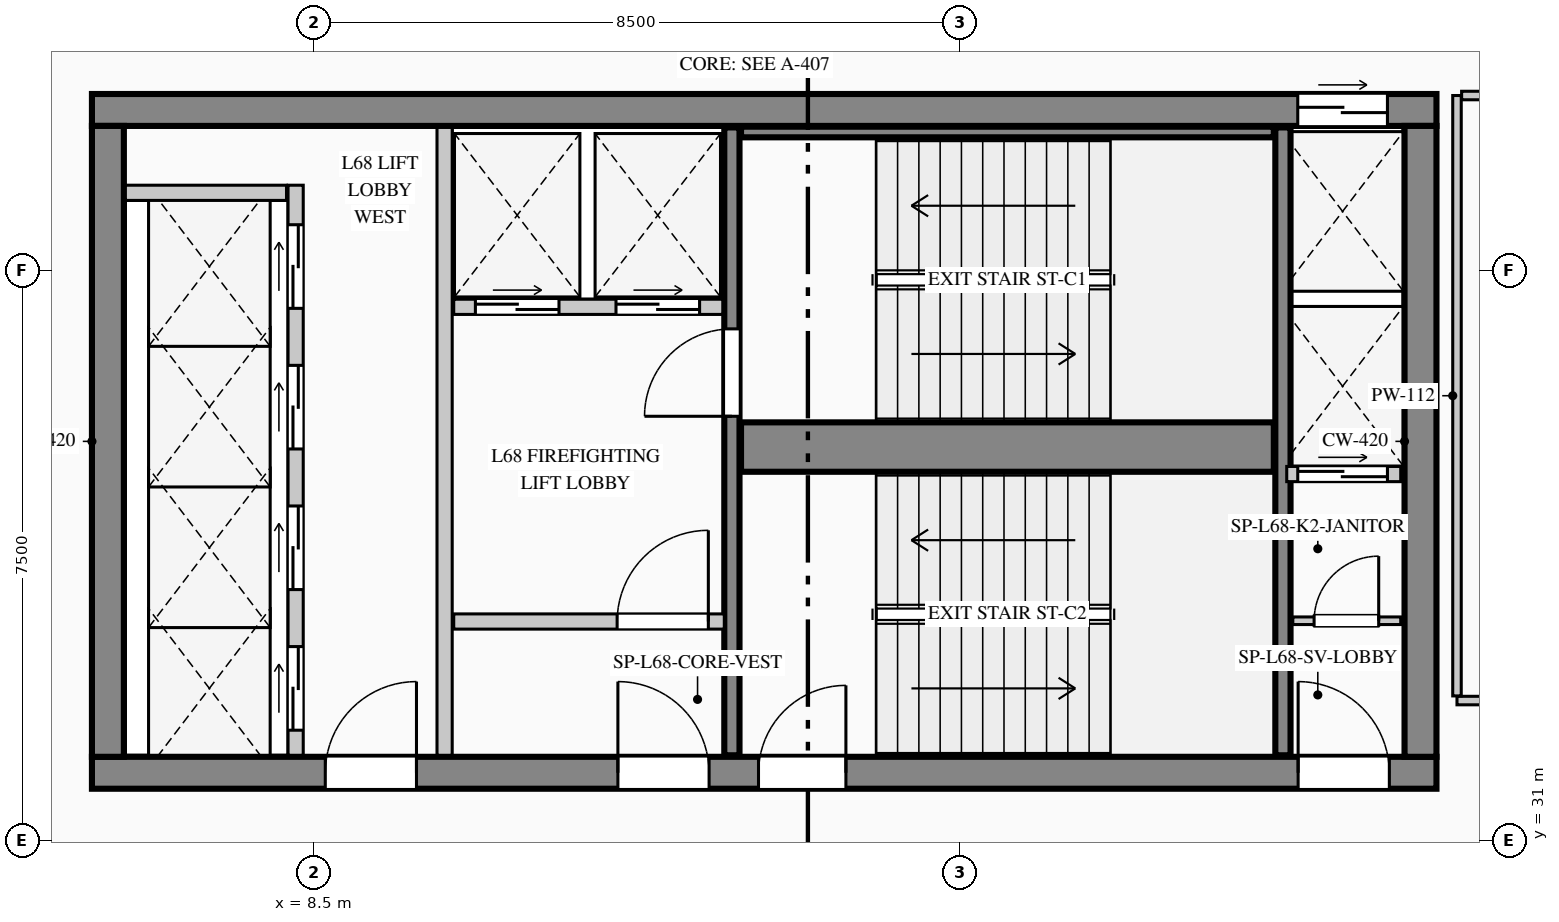
"""IFC4 building model, lengths in metres.
Left out: names, types, materials, properties, quantities, classifications, styles, units other than length and angle.
Written with IfcOpenShell. Run it as: python <this file> out.ifc"""

import sys

from ifc_helpers import new_model, si_unit, direction, frame, frame_2d, origin, place, context, subcontext, project, spatial, rectangle, extrude, element, fill, save


model = new_model("IFC4")
c1 = context("Model", 3, precision=1e-05, world=origin(), true_north=direction((0.0, 1.0)))
c2 = subcontext(c1, "Body", "Model", "MODEL_VIEW")
j1 = project(units=[si_unit("LENGTHUNIT", "METRE"), si_unit("PLANEANGLEUNIT", "RADIAN")], contexts=[c1])
p1 = place(None, origin())
s1 = spatial("IfcSite", under=j1, at=p1, CompositionType="ELEMENT")
p2 = place(p1, origin())
s2 = spatial("IfcBuilding", under=s1, at=p2, CompositionType="ELEMENT")
p3 = place(p2, frame((0.0, 0.0, 284.35)))
s3 = spatial("IfcBuildingStorey", under=s2, at=p3, CompositionType="ELEMENT", Elevation=284.35)
p4 = place(p3, frame((5.58, 40.61, 0.0), z_axis=(0.0, 0.0, 1.0), x_axis=(1.0, 0.0, 0.0)))
e1 = element("IfcWall", 1, at=p4, inside=s3, PredefinedType="SHEAR", context=c2, shape_type="SweptSolid", body=[
    extrude(rectangle(XDim=17.69, YDim=0.42, at=frame_2d((8.845, 0.0))), origin(), (0.0, 0.0, 1.0), 3.95),
])
p5 = place(p4, frame((15.865, 0.0, 0.0)))
e2 = element("IfcOpeningElement", 2, at=p5, cuts=e1, PredefinedType="OPENING", context=c2, shape_type="SweptSolid", body=[
    extrude(rectangle(XDim=1.18, YDim=2.25, at=frame_2d((0.59, 1.125))), frame((0.0, 0.22, 0.0), z_axis=(0.0, -1.0, 0.0), x_axis=(1.0, 0.0, 0.0)), (0.0, 0.0, 1.0), 0.44),
])
p6 = place(p3, frame((5.58, 31.89, 0.0), z_axis=(0.0, 0.0, 1.0), x_axis=(1.0, 0.0, 0.0)))
e3 = element("IfcWall", 3, at=p6, inside=s3, PredefinedType="SHEAR", context=c2, shape_type="SweptSolid", body=[
    extrude(rectangle(XDim=17.69, YDim=0.42, at=frame_2d((8.845, 0.0))), origin(), (0.0, 0.0, 1.0), 3.95),
])
p7 = place(p6, frame((3.07, 0.0, 0.0)))
e4 = element("IfcOpeningElement", 4, at=p7, cuts=e3, PredefinedType="OPENING", context=c2, shape_type="SweptSolid", body=[
    extrude(rectangle(XDim=1.2, YDim=2.2, at=frame_2d((0.6, 1.1))), frame((0.0, 0.22, 0.0), z_axis=(0.0, -1.0, 0.0), x_axis=(1.0, 0.0, 0.0)), (0.0, 0.0, 1.0), 0.44),
])
p8 = place(p6, frame((6.92, 0.0, 0.0)))
e5 = element("IfcOpeningElement", 5, at=p8, cuts=e3, PredefinedType="OPENING", context=c2, shape_type="SweptSolid", body=[
    extrude(rectangle(XDim=1.2, YDim=2.2, at=frame_2d((0.6, 1.1))), frame((0.0, 0.22, 0.0), z_axis=(0.0, -1.0, 0.0), x_axis=(1.0, 0.0, 0.0)), (0.0, 0.0, 1.0), 0.44),
])
p9 = place(p6, frame((8.77, 0.0, 0.0)))
e6 = element("IfcOpeningElement", 6, at=p9, cuts=e3, PredefinedType="OPENING", context=c2, shape_type="SweptSolid", body=[
    extrude(rectangle(XDim=1.15, YDim=2.2, at=frame_2d((0.575, 1.1))), frame((0.0, 0.22, 0.0), z_axis=(0.0, -1.0, 0.0), x_axis=(1.0, 0.0, 0.0)), (0.0, 0.0, 1.0), 0.44),
])
p10 = place(p6, frame((15.87, 0.0, 0.0)))
e7 = element("IfcOpeningElement", 7, at=p10, cuts=e3, PredefinedType="OPENING", context=c2, shape_type="SweptSolid", body=[
    extrude(rectangle(XDim=1.2, YDim=2.2, at=frame_2d((0.6, 1.1))), frame((0.0, 0.22, 0.0), z_axis=(0.0, -1.0, 0.0), x_axis=(1.0, 0.0, 0.0)), (0.0, 0.0, 1.0), 0.44),
])
for number, where, z_axis, x_axis in (
    (8, (5.79, 32.1, 0.0), (0.0, 0.0, 1.0), (0.0, 1.0, 0.0)),
    (9, (23.06, 32.1, 0.0), (0.0, 0.0, 1.0), (0.0, 1.0, 0.0)),
):
    element("IfcWall", number, at=place(p3, frame(where, z_axis=z_axis, x_axis=x_axis)), inside=s3, PredefinedType="SHEAR", context=c2, shape_type="SweptSolid", body=[
        extrude(rectangle(XDim=8.3, YDim=0.42, at=frame_2d((4.15, 0.0))), origin(), (0.0, 0.0, 1.0), 3.95),
    ])
p11 = place(p3, frame((14.0, 32.12, 0.0), z_axis=(0.0, 0.0, 1.0), x_axis=(0.0, 1.0, 0.0)))
e10 = element("IfcWall", 10, at=p11, inside=s3, PredefinedType="SHEAR", context=c2, shape_type="SweptSolid", body=[
    extrude(rectangle(XDim=8.26, YDim=0.2, at=frame_2d((4.13, 0.0))), origin(), (0.0, 0.0, 1.0), 3.95),
])
p12 = place(p11, frame((4.46, 0.0, 0.0)))
e11 = element("IfcOpeningElement", 11, at=p12, cuts=e10, PredefinedType="OPENING", context=c2, shape_type="SweptSolid", body=[
    extrude(rectangle(XDim=1.15, YDim=2.2, at=frame_2d((0.575, 1.1))), frame((0.0, 0.11, 0.0), z_axis=(0.0, -1.0, 0.0), x_axis=(1.0, 0.0, 0.0)), (0.0, 0.0, 1.0), 0.22),
])
p13 = place(p3, frame((14.12, 36.175, 0.0), z_axis=(0.0, 0.0, 1.0), x_axis=(1.0, 0.0, 0.0)))
e12 = element("IfcWall", 12, at=p13, inside=s3, PredefinedType="SHEAR", context=c2, shape_type="SweptSolid", body=[
    extrude(rectangle(XDim=7.01, YDim=0.65, at=frame_2d((3.505, 0.0))), origin(), (0.0, 0.0, 1.0), 3.95),
])
p14 = place(p3, frame((21.25, 32.12, 0.0), z_axis=(0.0, 0.0, 1.0), x_axis=(0.0, 1.0, 0.0)))
e13 = element("IfcWall", 13, at=p14, inside=s3, PredefinedType="SHEAR", context=c2, shape_type="SweptSolid", body=[
    extrude(rectangle(XDim=8.26, YDim=0.2, at=frame_2d((4.13, 0.0))), origin(), (0.0, 0.0, 1.0), 3.95),
])
p15 = place(p3, frame((14.12, 40.32, 0.0), z_axis=(0.0, 0.0, 1.0), x_axis=(1.0, 0.0, 0.0)))
e14 = element("IfcWall", 14, at=p15, inside=s3, PredefinedType="SHEAR", context=c2, shape_type="SweptSolid", body=[
    extrude(rectangle(XDim=7.01, YDim=0.14, at=frame_2d((3.505, 0.0))), origin(), (0.0, 0.0, 1.0), 3.95),
])
p16 = place(p3, frame((5.6, 4.32, 0.0), z_axis=(0.0, 0.0, 1.0), x_axis=(-0.075839920993, 0.997120006009, 0.0)))
e15 = element("IfcWall", 15, at=p16, inside=s3, PredefinedType="STANDARD", context=c2, shape_type="SweptSolid", body=[
    extrude(rectangle(XDim=37.468, YDim=0.24, at=frame_2d((18.734, 0.0))), origin(), (0.0, 0.0, 1.0), 3.7),
])
p17 = place(p16, frame((12.663, 0.0, 0.9)))
e16 = element("IfcOpeningElement", 16, at=p17, cuts=e15, PredefinedType="OPENING", context=c2, shape_type="SweptSolid", body=[
    extrude(rectangle(XDim=1.65, YDim=1.95, at=frame_2d((0.825, 0.975))), frame((0.0, 0.13, 0.0), z_axis=(0.0, -1.0, 0.0), x_axis=(1.0, 0.0, 0.0)), (0.0, 0.0, 1.0), 0.26),
])
p18 = place(p3, frame((8.26, 32.12, 0.0), z_axis=(0.0, 0.0, 1.0), x_axis=(0.0, 1.0, 0.0)))
e17 = element("IfcWall", 17, at=p18, inside=s3, PredefinedType="PARTITIONING", context=c2, shape_type="SweptSolid", body=[
    extrude(rectangle(XDim=7.5, YDim=0.2, at=frame_2d((3.75, 0.0))), origin(), (0.0, 0.0, 1.0), 3.7),
])
p19 = place(p18, frame((0.33, 0.0, 0.0)))
e18 = element("IfcOpeningElement", 18, at=p19, cuts=e17, PredefinedType="OPENING", context=c2, shape_type="SweptSolid", body=[
    extrude(rectangle(XDim=1.1, YDim=2.2, at=frame_2d((0.55, 1.1))), frame((0.0, 0.11, 0.0), z_axis=(0.0, -1.0, 0.0), x_axis=(1.0, 0.0, 0.0)), (0.0, 0.0, 1.0), 0.22),
])
p20 = place(p18, frame((2.18, 0.0, 0.0)))
e19 = element("IfcOpeningElement", 19, at=p20, cuts=e17, PredefinedType="OPENING", context=c2, shape_type="SweptSolid", body=[
    extrude(rectangle(XDim=1.1, YDim=2.2, at=frame_2d((0.55, 1.1))), frame((0.0, 0.11, 0.0), z_axis=(0.0, -1.0, 0.0), x_axis=(1.0, 0.0, 0.0)), (0.0, 0.0, 1.0), 0.22),
])
p21 = place(p18, frame((4.03, 0.0, 0.0)))
e20 = element("IfcOpeningElement", 20, at=p21, cuts=e17, PredefinedType="OPENING", context=c2, shape_type="SweptSolid", body=[
    extrude(rectangle(XDim=1.1, YDim=2.2, at=frame_2d((0.55, 1.1))), frame((0.0, 0.11, 0.0), z_axis=(0.0, -1.0, 0.0), x_axis=(1.0, 0.0, 0.0)), (0.0, 0.0, 1.0), 0.22),
])
p22 = place(p18, frame((5.88, 0.0, 0.0)))
e21 = element("IfcOpeningElement", 21, at=p22, cuts=e17, PredefinedType="OPENING", context=c2, shape_type="SweptSolid", body=[
    extrude(rectangle(XDim=1.1, YDim=2.2, at=frame_2d((0.55, 1.1))), frame((0.0, 0.11, 0.0), z_axis=(0.0, -1.0, 0.0), x_axis=(1.0, 0.0, 0.0)), (0.0, 0.0, 1.0), 0.22),
])
p23 = place(p3, frame((6.02, 39.52, 0.0), z_axis=(0.0, 0.0, 1.0), x_axis=(1.0, 0.0, 0.0)))
e22 = element("IfcWall", 22, at=p23, inside=s3, PredefinedType="PARTITIONING", context=c2, shape_type="SweptSolid", body=[
    extrude(rectangle(XDim=2.12, YDim=0.2, at=frame_2d((1.06, 0.0))), origin(), (0.0, 0.0, 1.0), 3.7),
])
p24 = place(p3, frame((10.22, 32.12, 0.0), z_axis=(0.0, 0.0, 1.0), x_axis=(0.0, 1.0, 0.0)))
e23 = element("IfcWall", 23, at=p24, inside=s3, PredefinedType="PARTITIONING", context=c2, shape_type="SweptSolid", body=[
    extrude(rectangle(XDim=8.26, YDim=0.2, at=frame_2d((4.13, 0.0))), origin(), (0.0, 0.0, 1.0), 3.7),
])
p25 = place(p3, frame((10.34, 38.02, 0.0), z_axis=(0.0, 0.0, 1.0), x_axis=(1.0, 0.0, 0.0)))
e24 = element("IfcWall", 24, at=p25, inside=s3, PredefinedType="PARTITIONING", context=c2, shape_type="SweptSolid", body=[
    extrude(rectangle(XDim=3.54, YDim=0.2, at=frame_2d((1.77, 0.0))), origin(), (0.0, 0.0, 1.0), 3.7),
])
p26 = place(p25, frame((0.285, 0.0, 0.0)))
e25 = element("IfcOpeningElement", 25, at=p26, cuts=e24, PredefinedType="OPENING", context=c2, shape_type="SweptSolid", body=[
    extrude(rectangle(XDim=1.1, YDim=2.2, at=frame_2d((0.55, 1.1))), frame((0.0, 0.11, 0.0), z_axis=(0.0, -1.0, 0.0), x_axis=(1.0, 0.0, 0.0)), (0.0, 0.0, 1.0), 0.22),
])
p27 = place(p25, frame((2.135, 0.0, 0.0)))
e26 = element("IfcOpeningElement", 26, at=p27, cuts=e24, PredefinedType="OPENING", context=c2, shape_type="SweptSolid", body=[
    extrude(rectangle(XDim=1.1, YDim=2.2, at=frame_2d((0.55, 1.1))), frame((0.0, 0.11, 0.0), z_axis=(0.0, -1.0, 0.0), x_axis=(1.0, 0.0, 0.0)), (0.0, 0.0, 1.0), 0.22),
])
p28 = place(p3, frame((10.34, 33.88, 0.0), z_axis=(0.0, 0.0, 1.0), x_axis=(1.0, 0.0, 0.0)))
e27 = element("IfcWall", 27, at=p28, inside=s3, PredefinedType="PARTITIONING", context=c2, shape_type="SweptSolid", body=[
    extrude(rectangle(XDim=3.56, YDim=0.2, at=frame_2d((1.78, 0.0))), origin(), (0.0, 0.0, 1.0), 3.7),
])
p29 = place(p28, frame((2.15, 0.0, 0.0)))
e28 = element("IfcOpeningElement", 28, at=p29, cuts=e27, PredefinedType="OPENING", context=c2, shape_type="SweptSolid", body=[
    extrude(rectangle(XDim=1.2, YDim=2.2, at=frame_2d((0.6, 1.1))), frame((0.0, 0.11, 0.0), z_axis=(0.0, -1.0, 0.0), x_axis=(1.0, 0.0, 0.0)), (0.0, 0.0, 1.0), 0.22),
])
p30 = place(p3, frame((21.38, 33.89, 0.0), z_axis=(0.0, 0.0, 1.0), x_axis=(1.0, 0.0, 0.0)))
e29 = element("IfcWall", 29, at=p30, inside=s3, PredefinedType="PARTITIONING", context=c2, shape_type="SweptSolid", body=[
    extrude(rectangle(XDim=1.42, YDim=0.1, at=frame_2d((0.71, 0.0))), origin(), (0.0, 0.0, 1.0), 3.7),
])
p31 = place(p30, frame((0.28, 0.0, 0.0)))
e30 = element("IfcOpeningElement", 30, at=p31, cuts=e29, PredefinedType="OPENING", context=c2, shape_type="SweptSolid", body=[
    extrude(rectangle(XDim=0.85, YDim=2.1, at=frame_2d((0.425, 1.05))), frame((0.0, 0.06, 0.0), z_axis=(0.0, -1.0, 0.0), x_axis=(1.0, 0.0, 0.0)), (0.0, 0.0, 1.0), 0.12),
])
p32 = place(p3, frame((21.3, 35.82, 0.0), z_axis=(0.0, 0.0, 1.0), x_axis=(1.0, 0.0, 0.0)))
e31 = element("IfcWall", 31, at=p32, inside=s3, PredefinedType="PARTITIONING", context=c2, shape_type="SweptSolid", body=[
    extrude(rectangle(XDim=1.5, YDim=0.2, at=frame_2d((0.75, 0.0))), origin(), (0.0, 0.0, 1.0), 3.7),
])
p33 = place(p32, frame((0.145, 0.0, 0.0)))
e32 = element("IfcOpeningElement", 32, at=p33, cuts=e31, PredefinedType="OPENING", context=c2, shape_type="SweptSolid", body=[
    extrude(rectangle(XDim=1.18, YDim=2.25, at=frame_2d((0.59, 1.125))), frame((0.0, 0.11, 0.0), z_axis=(0.0, -1.0, 0.0), x_axis=(1.0, 0.0, 0.0)), (0.0, 0.0, 1.0), 0.22),
])
p34 = place(p3, frame((28.654, 32.84, 0.0), z_axis=(0.0, 0.0, 1.0), x_axis=(-1.0, 0.0, 0.0)))
e33 = element("IfcWall", 33, at=p34, inside=s3, PredefinedType="PARTITIONING", context=c2, shape_type="SweptSolid", body=[
    extrude(rectangle(XDim=5.114, YDim=0.112, at=frame_2d((2.557, 0.0))), origin(), (0.0, 0.0, 1.0), 3.7),
])
p35 = place(p34, frame((2.677, 0.0, 0.0)))
e34 = element("IfcOpeningElement", 34, at=p35, cuts=e33, PredefinedType="OPENING", context=c2, shape_type="SweptSolid", body=[
    extrude(rectangle(XDim=1.0, YDim=2.15, at=frame_2d((0.5, 1.075))), frame((0.0, 0.066, 0.0), z_axis=(0.0, -1.0, 0.0), x_axis=(1.0, 0.0, 0.0)), (0.0, 0.0, 1.0), 0.132),
])
p36 = place(p3, frame((23.54, 32.901, 0.0), z_axis=(0.0, 0.0, 1.0), x_axis=(0.0, 1.0, 0.0)))
e35 = element("IfcWall", 35, at=p36, inside=s3, PredefinedType="PARTITIONING", context=c2, shape_type="SweptSolid", body=[
    extrude(rectangle(XDim=7.899, YDim=0.112, at=frame_2d((3.95, 0.0))), origin(), (0.0, 0.0, 1.0), 3.7),
])
p37 = place(p3, frame((23.601, 40.8, 0.0), z_axis=(0.0, 0.0, 1.0), x_axis=(1.0, 0.0, 0.0)))
e36 = element("IfcWall", 36, at=p37, inside=s3, PredefinedType="PARTITIONING", context=c2, shape_type="SweptSolid", body=[
    extrude(rectangle(XDim=5.869, YDim=0.112, at=frame_2d((2.935, 0.0))), origin(), (0.0, 0.0, 1.0), 3.7),
])
p38 = place(p7, origin())
e37 = element("IfcDoor", 37, at=p38, inside=s3, OperationType="SINGLE_SWING_RIGHT", PredefinedType="DOOR", context=c2, shape_type="SweptSolid", body=[
    extrude(rectangle(XDim=1.2, YDim=2.2, at=frame_2d((0.6, 1.1))), frame((0.0, 0.025, 0.0), z_axis=(0.0, -1.0, 0.0), x_axis=(1.0, 0.0, 0.0)), (0.0, 0.0, 1.0), 0.05),
])
fill(e4, e37)
p39 = place(p8, origin())
e38 = element("IfcDoor", 38, at=p39, inside=s3, OperationType="SINGLE_SWING_LEFT", PredefinedType="DOOR", context=c2, shape_type="SweptSolid", body=[
    extrude(rectangle(XDim=1.2, YDim=2.2, at=frame_2d((0.6, 1.1))), frame((0.0, 0.025, 0.0), z_axis=(0.0, -1.0, 0.0), x_axis=(1.0, 0.0, 0.0)), (0.0, 0.0, 1.0), 0.05),
])
fill(e5, e38)
p40 = place(p9, origin())
e39 = element("IfcDoor", 39, at=p40, inside=s3, OperationType="SINGLE_SWING_RIGHT", PredefinedType="DOOR", context=c2, shape_type="SweptSolid", body=[
    extrude(rectangle(XDim=1.15, YDim=2.2, at=frame_2d((0.575, 1.1))), frame((0.0, 0.025, 0.0), z_axis=(0.0, -1.0, 0.0), x_axis=(1.0, 0.0, 0.0)), (0.0, 0.0, 1.0), 0.05),
])
fill(e6, e39)
p41 = place(p10, origin())
e40 = element("IfcDoor", 40, at=p41, inside=s3, OperationType="SINGLE_SWING_LEFT", PredefinedType="DOOR", context=c2, shape_type="SweptSolid", body=[
    extrude(rectangle(XDim=1.2, YDim=2.2, at=frame_2d((0.6, 1.1))), frame((0.0, 0.025, 0.0), z_axis=(0.0, -1.0, 0.0), x_axis=(1.0, 0.0, 0.0)), (0.0, 0.0, 1.0), 0.05),
])
fill(e7, e40)
p42 = place(p29, origin())
e41 = element("IfcDoor", 41, at=p42, inside=s3, OperationType="SINGLE_SWING_RIGHT", PredefinedType="DOOR", context=c2, shape_type="SweptSolid", body=[
    extrude(rectangle(XDim=1.2, YDim=2.2, at=frame_2d((0.6, 1.1))), frame((0.0, 0.025, 0.0), z_axis=(0.0, -1.0, 0.0), x_axis=(1.0, 0.0, 0.0)), (0.0, 0.0, 1.0), 0.05),
])
fill(e28, e41)
p43 = place(p31, origin())
e42 = element("IfcDoor", 42, at=p43, inside=s3, OperationType="SINGLE_SWING_RIGHT", PredefinedType="DOOR", context=c2, shape_type="SweptSolid", body=[
    extrude(rectangle(XDim=0.85, YDim=2.1, at=frame_2d((0.425, 1.05))), frame((0.0, 0.025, 0.0), z_axis=(0.0, -1.0, 0.0), x_axis=(1.0, 0.0, 0.0)), (0.0, 0.0, 1.0), 0.05),
])
fill(e30, e42)
p44 = place(p12, origin())
e43 = element("IfcDoor", 43, at=p44, inside=s3, OperationType="SINGLE_SWING_LEFT", PredefinedType="DOOR", context=c2, shape_type="SweptSolid", body=[
    extrude(rectangle(XDim=1.15, YDim=2.2, at=frame_2d((0.575, 1.1))), frame((0.0, 0.025, 0.0), z_axis=(0.0, -1.0, 0.0), x_axis=(1.0, 0.0, 0.0)), (0.0, 0.0, 1.0), 0.05),
])
fill(e11, e43)
p45 = place(p19, origin())
e44 = element("IfcDoor", 44, at=p45, inside=s3, OperationType="DOUBLE_DOOR_SLIDING", PredefinedType="DOOR", context=c2, shape_type="SweptSolid", body=[
    extrude(rectangle(XDim=1.1, YDim=2.2, at=frame_2d((0.55, 1.1))), frame((0.0, 0.025, 0.0), z_axis=(0.0, -1.0, 0.0), x_axis=(1.0, 0.0, 0.0)), (0.0, 0.0, 1.0), 0.05),
])
fill(e18, e44)
p46 = place(p20, origin())
e45 = element("IfcDoor", 45, at=p46, inside=s3, OperationType="DOUBLE_DOOR_SLIDING", PredefinedType="DOOR", context=c2, shape_type="SweptSolid", body=[
    extrude(rectangle(XDim=1.1, YDim=2.2, at=frame_2d((0.55, 1.1))), frame((0.0, 0.025, 0.0), z_axis=(0.0, -1.0, 0.0), x_axis=(1.0, 0.0, 0.0)), (0.0, 0.0, 1.0), 0.05),
])
fill(e19, e45)
p47 = place(p21, origin())
e46 = element("IfcDoor", 46, at=p47, inside=s3, OperationType="DOUBLE_DOOR_SLIDING", PredefinedType="DOOR", context=c2, shape_type="SweptSolid", body=[
    extrude(rectangle(XDim=1.1, YDim=2.2, at=frame_2d((0.55, 1.1))), frame((0.0, 0.025, 0.0), z_axis=(0.0, -1.0, 0.0), x_axis=(1.0, 0.0, 0.0)), (0.0, 0.0, 1.0), 0.05),
])
fill(e20, e46)
p48 = place(p22, origin())
e47 = element("IfcDoor", 47, at=p48, inside=s3, OperationType="DOUBLE_DOOR_SLIDING", PredefinedType="DOOR", context=c2, shape_type="SweptSolid", body=[
    extrude(rectangle(XDim=1.1, YDim=2.2, at=frame_2d((0.55, 1.1))), frame((0.0, 0.025, 0.0), z_axis=(0.0, -1.0, 0.0), x_axis=(1.0, 0.0, 0.0)), (0.0, 0.0, 1.0), 0.05),
])
fill(e21, e47)
p49 = place(p26, origin())
e48 = element("IfcDoor", 48, at=p49, inside=s3, OperationType="DOUBLE_DOOR_SLIDING", PredefinedType="DOOR", context=c2, shape_type="SweptSolid", body=[
    extrude(rectangle(XDim=1.1, YDim=2.2, at=frame_2d((0.55, 1.1))), frame((0.0, 0.025, 0.0), z_axis=(0.0, -1.0, 0.0), x_axis=(1.0, 0.0, 0.0)), (0.0, 0.0, 1.0), 0.05),
])
fill(e25, e48)
p50 = place(p27, origin())
e49 = element("IfcDoor", 49, at=p50, inside=s3, OperationType="DOUBLE_DOOR_SLIDING", PredefinedType="DOOR", context=c2, shape_type="SweptSolid", body=[
    extrude(rectangle(XDim=1.1, YDim=2.2, at=frame_2d((0.55, 1.1))), frame((0.0, 0.025, 0.0), z_axis=(0.0, -1.0, 0.0), x_axis=(1.0, 0.0, 0.0)), (0.0, 0.0, 1.0), 0.05),
])
fill(e26, e49)
p51 = place(p5, origin())
e50 = element("IfcDoor", 50, at=p51, inside=s3, OperationType="DOUBLE_DOOR_SLIDING", PredefinedType="DOOR", context=c2, shape_type="SweptSolid", body=[
    extrude(rectangle(XDim=1.18, YDim=2.25, at=frame_2d((0.59, 1.125))), frame((0.0, 0.025, 0.0), z_axis=(0.0, -1.0, 0.0), x_axis=(1.0, 0.0, 0.0)), (0.0, 0.0, 1.0), 0.05),
])
fill(e2, e50)
p52 = place(p33, origin())
e51 = element("IfcDoor", 51, at=p52, inside=s3, OperationType="DOUBLE_DOOR_SLIDING", PredefinedType="DOOR", context=c2, shape_type="SweptSolid", body=[
    extrude(rectangle(XDim=1.18, YDim=2.25, at=frame_2d((0.59, 1.125))), frame((0.0, 0.025, 0.0), z_axis=(0.0, -1.0, 0.0), x_axis=(1.0, 0.0, 0.0)), (0.0, 0.0, 1.0), 0.05),
])
fill(e32, e51)
save(model, sys.argv[1])
